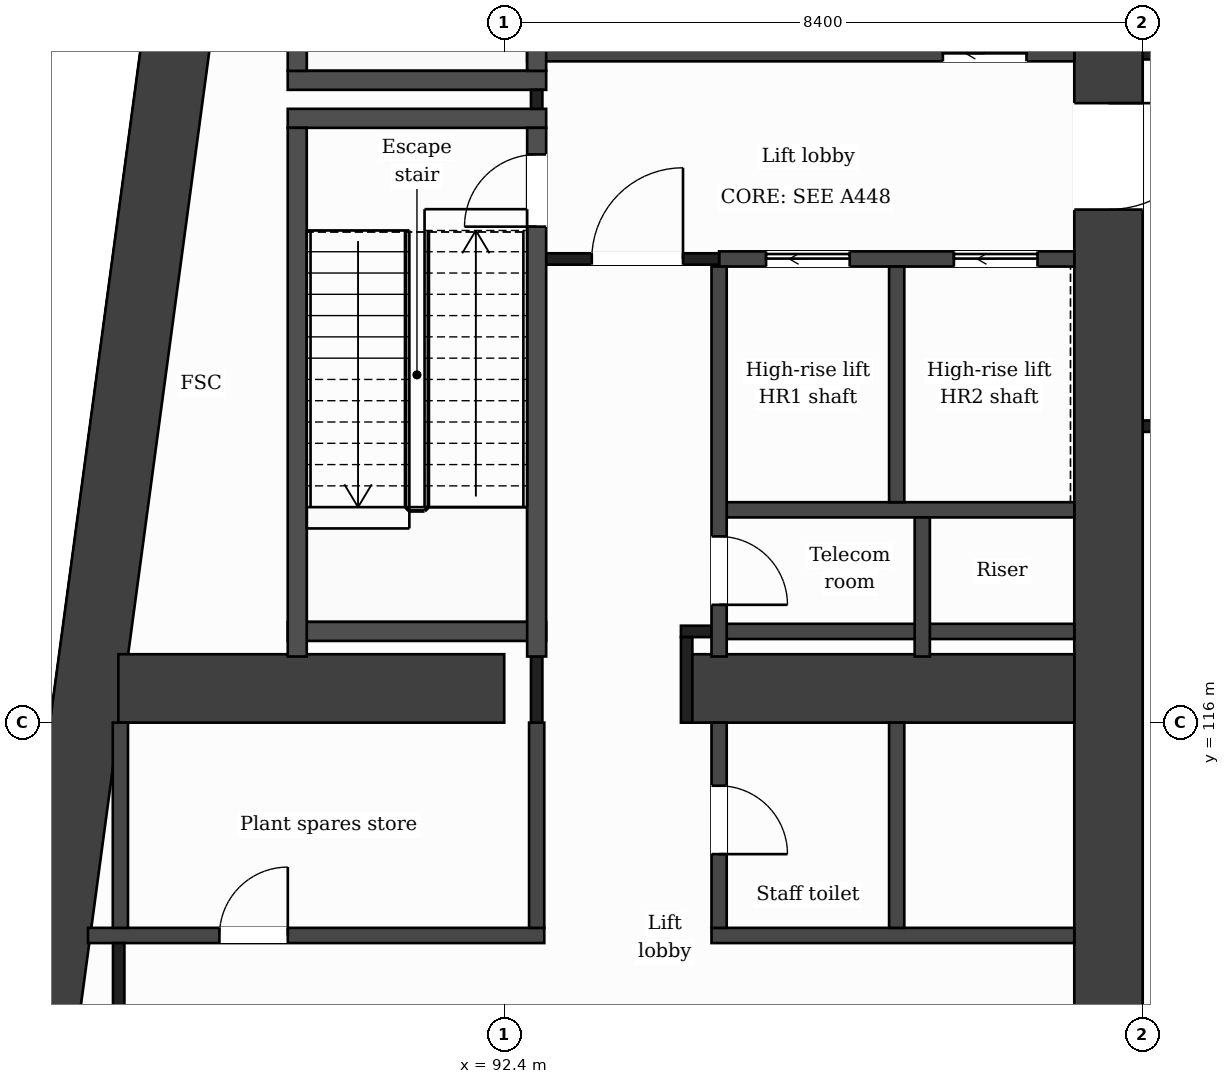
"""IFC4 building model, lengths in metres.
Left out: names, types, materials, properties, quantities, classifications, styles, units other than length and angle.
Written with IfcOpenShell. Run it as: python <this file> out.ifc"""

import sys

from ifc_helpers import new_model, si_unit, direction, frame, frame_2d, origin, place, context, subcontext, project, spatial, rectangle, extrude, element, fill, save


model = new_model("IFC4")
c1 = context("Model", 3, precision=1e-05, world=origin(), true_north=direction((0.0, 1.0)))
c2 = subcontext(c1, "Body", "Model", "MODEL_VIEW")
j1 = project(units=[si_unit("LENGTHUNIT", "METRE"), si_unit("PLANEANGLEUNIT", "RADIAN")], contexts=[c1])
p1 = place(None, origin())
s1 = spatial("IfcSite", under=j1, at=p1, CompositionType="ELEMENT")
p2 = place(p1, origin())
s2 = spatial("IfcBuilding", under=s1, at=p2, CompositionType="ELEMENT")
p3 = place(p2, frame((0.0, 0.0, 197.2)))
s3 = spatial("IfcBuildingStorey", under=s2, at=p3, CompositionType="ELEMENT", Elevation=197.2)
p4 = place(p3, frame((100.35, 131.95, 0.0), z_axis=(0.0, 0.0, 1.0), x_axis=(0.0, -1.0, 0.0)))
e1 = element("IfcWall", 1, at=p4, inside=s3, PredefinedType="SHEAR", context=c2, shape_type="SweptSolid", body=[
    extrude(rectangle(XDim=21.1, YDim=0.9, at=frame_2d((10.55, 0.0))), origin(), (0.0, 0.0, 1.0), 5.0),
])
p5 = place(p4, frame((2.35, 0.0, 0.0)))
e2 = element("IfcOpeningElement", 2, at=p5, cuts=e1, PredefinedType="OPENING", context=c2, shape_type="SweptSolid", body=[
    extrude(rectangle(XDim=1.2, YDim=2.1, at=frame_2d((0.6, 1.05))), frame((0.0, 0.46, 0.0), z_axis=(0.0, -1.0, 0.0), x_axis=(1.0, 0.0, 0.0)), (0.0, 0.0, 1.0), 0.92),
])
p6 = place(p4, frame((7.8, 0.0, 0.0)))
e3 = element("IfcOpeningElement", 3, at=p6, cuts=e1, PredefinedType="OPENING", context=c2, shape_type="SweptSolid", body=[
    extrude(rectangle(XDim=1.4, YDim=2.1, at=frame_2d((0.7, 1.05))), frame((0.0, 0.46, 0.0), z_axis=(0.0, -1.0, 0.0), x_axis=(1.0, 0.0, 0.0)), (0.0, 0.0, 1.0), 0.92),
])
p7 = place(p3, frame((86.184, 110.85, 0.0), z_axis=(0.0, 0.0, 1.0), x_axis=(0.133410495943, 0.991060865725, 0.0)))
e4 = element("IfcWall", 4, at=p7, inside=s3, PredefinedType="SHEAR", context=c2, shape_type="SweptSolid", body=[
    extrude(rectangle(XDim=21.29, YDim=0.9, at=frame_2d((10.645, 0.0))), origin(), (0.0, 0.0, 1.0), 5.0),
])
p8 = place(p3, frame((87.323, 116.45, 0.0), z_axis=(0.0, 0.0, 1.0), x_axis=(1.0, 0.0, 0.0)))
e5 = element("IfcWall", 5, at=p8, inside=s3, PredefinedType="SHEAR", context=c2, shape_type="SweptSolid", body=[
    extrude(rectangle(XDim=5.077, YDim=0.9, at=frame_2d((2.539, 0.0))), origin(), (0.0, 0.0, 1.0), 5.0),
])
p9 = place(p3, frame((94.8, 116.45, 0.0), z_axis=(0.0, 0.0, 1.0), x_axis=(1.0, 0.0, 0.0)))
e6 = element("IfcWall", 6, at=p9, inside=s3, PredefinedType="SHEAR", context=c2, shape_type="SweptSolid", body=[
    extrude(rectangle(XDim=5.1, YDim=0.9, at=frame_2d((2.55, 0.0))), origin(), (0.0, 0.0, 1.0), 5.0),
])
p10 = place(p3, frame((86.924, 113.2, 0.0), z_axis=(0.0, 0.0, 1.0), x_axis=(1.0, 0.0, 0.0)))
e7 = element("IfcWall", 7, at=p10, inside=s3, PredefinedType="PARTITIONING", context=c2, shape_type="SweptSolid", body=[
    extrude(rectangle(XDim=6.003, YDim=0.2, at=frame_2d((3.001, 0.0))), origin(), (0.0, 0.0, 1.0), 4.68),
])
p11 = place(p10, frame((1.729, 0.0, 0.0)))
e8 = element("IfcOpeningElement", 8, at=p11, cuts=e7, PredefinedType="OPENING", context=c2, shape_type="SweptSolid", body=[
    extrude(rectangle(XDim=0.9, YDim=2.1, at=frame_2d((0.45, 1.05))), frame((0.0, 0.11, 0.0), z_axis=(0.0, -1.0, 0.0), x_axis=(1.0, 0.0, 0.0)), (0.0, 0.0, 1.0), 0.22),
])
p12 = place(p3, frame((95.127, 113.2, 0.0), z_axis=(0.0, 0.0, 1.0), x_axis=(1.0, 0.0, 0.0)))
e9 = element("IfcWall", 9, at=p12, inside=s3, PredefinedType="PARTITIONING", context=c2, shape_type="SweptSolid", body=[
    extrude(rectangle(XDim=4.773, YDim=0.2, at=frame_2d((2.386, 0.0))), origin(), (0.0, 0.0, 1.0), 4.68),
])
p13 = place(p3, frame((95.227, 117.2, 0.0), z_axis=(0.0, 0.0, 1.0), x_axis=(1.0, 0.0, 0.0)))
e10 = element("IfcWall", 10, at=p13, inside=s3, PredefinedType="PARTITIONING", context=c2, shape_type="SweptSolid", body=[
    extrude(rectangle(XDim=4.673, YDim=0.2, at=frame_2d((2.336, 0.0))), origin(), (0.0, 0.0, 1.0), 4.68),
])
p14 = place(p3, frame((94.725, 117.2, 0.0), z_axis=(0.0, 0.0, 1.0), x_axis=(1.0, 0.0, 0.0)))
e11 = element("IfcWall", 11, at=p14, inside=s3, PredefinedType="PARTITIONING", context=c2, shape_type="SweptSolid", body=[
    extrude(rectangle(XDim=0.502, YDim=0.15, at=frame_2d((0.251, 0.0))), origin(), (0.0, 0.0, 1.0), 4.68),
])
p15 = place(p3, frame((89.552, 117.2, 0.0), z_axis=(0.0, 0.0, 1.0), x_axis=(1.0, 0.0, 0.0)))
e12 = element("IfcWall", 12, at=p15, inside=s3, PredefinedType="PARTITIONING", context=c2, shape_type="SweptSolid", body=[
    extrude(rectangle(XDim=3.4, YDim=0.25, at=frame_2d((1.7, 0.0))), origin(), (0.0, 0.0, 1.0), 4.68),
])
p16 = place(p3, frame((95.227, 118.8, 0.0), z_axis=(0.0, 0.0, 1.0), x_axis=(1.0, 0.0, 0.0)))
e13 = element("IfcWall", 13, at=p16, inside=s3, PredefinedType="PARTITIONING", context=c2, shape_type="SweptSolid", body=[
    extrude(rectangle(XDim=4.673, YDim=0.2, at=frame_2d((2.336, 0.0))), origin(), (0.0, 0.0, 1.0), 4.68),
])
p17 = place(p3, frame((100.8, 119.9, 0.0), z_axis=(0.0, 0.0, 1.0), x_axis=(1.0, 0.0, 0.0)))
e14 = element("IfcWall", 14, at=p17, inside=s3, PredefinedType="PARTITIONING", context=c2, shape_type="SweptSolid", body=[
    extrude(rectangle(XDim=25.2, YDim=0.15, at=frame_2d((12.6, 0.0))), origin(), (0.0, 0.0, 1.0), 4.68),
])
p18 = place(p17, frame((3.6, 0.0, 0.0)))
e15 = element("IfcOpeningElement", 15, at=p18, cuts=e14, PredefinedType="OPENING", context=c2, shape_type="SweptSolid", body=[
    extrude(rectangle(XDim=1.2, YDim=2.1, at=frame_2d((0.6, 1.05))), frame((0.0, 0.085, 0.0), z_axis=(0.0, -1.0, 0.0), x_axis=(1.0, 0.0, 0.0)), (0.0, 0.0, 1.0), 0.17),
])
p19 = place(p17, frame((12.0, 0.0, 0.0)))
e16 = element("IfcOpeningElement", 16, at=p19, cuts=e14, PredefinedType="OPENING", context=c2, shape_type="SweptSolid", body=[
    extrude(rectangle(XDim=1.2, YDim=2.1, at=frame_2d((0.6, 1.05))), frame((0.0, 0.085, 0.0), z_axis=(0.0, -1.0, 0.0), x_axis=(1.0, 0.0, 0.0)), (0.0, 0.0, 1.0), 0.17),
])
p20 = place(p17, frame((20.4, 0.0, 0.0)))
e17 = element("IfcOpeningElement", 17, at=p20, cuts=e14, PredefinedType="OPENING", context=c2, shape_type="SweptSolid", body=[
    extrude(rectangle(XDim=1.2, YDim=2.1, at=frame_2d((0.6, 1.05))), frame((0.0, 0.085, 0.0), z_axis=(0.0, -1.0, 0.0), x_axis=(1.0, 0.0, 0.0)), (0.0, 0.0, 1.0), 0.17),
])
p21 = place(p3, frame((95.227, 122.1, 0.0), z_axis=(0.0, 0.0, 1.0), x_axis=(1.0, 0.0, 0.0)))
e18 = element("IfcWall", 18, at=p21, inside=s3, PredefinedType="PARTITIONING", context=c2, shape_type="SweptSolid", body=[
    extrude(rectangle(XDim=4.673, YDim=0.2, at=frame_2d((2.336, 0.0))), origin(), (0.0, 0.0, 1.0), 4.68),
])
p22 = place(p21, frame((0.618, 0.0, 0.0)))
e19 = element("IfcOpeningElement", 19, at=p22, cuts=e18, PredefinedType="OPENING", context=c2, shape_type="SweptSolid", body=[
    extrude(rectangle(XDim=1.1, YDim=2.1, at=frame_2d((0.55, 1.05))), frame((0.0, 0.11, 0.0), z_axis=(0.0, -1.0, 0.0), x_axis=(1.0, 0.0, 0.0)), (0.0, 0.0, 1.0), 0.22),
])
p23 = place(p21, frame((3.089, 0.0, 0.0)))
e20 = element("IfcOpeningElement", 20, at=p23, cuts=e18, PredefinedType="OPENING", context=c2, shape_type="SweptSolid", body=[
    extrude(rectangle(XDim=1.1, YDim=2.1, at=frame_2d((0.55, 1.05))), frame((0.0, 0.11, 0.0), z_axis=(0.0, -1.0, 0.0), x_axis=(1.0, 0.0, 0.0)), (0.0, 0.0, 1.0), 0.22),
])
p24 = place(p3, frame((92.827, 122.1, 0.0), z_axis=(0.0, 0.0, 1.0), x_axis=(1.0, 0.0, 0.0)))
e21 = element("IfcWall", 21, at=p24, inside=s3, PredefinedType="PARTITIONING", context=c2, shape_type="SweptSolid", body=[
    extrude(rectangle(XDim=2.4, YDim=0.15, at=frame_2d((1.2, 0.0))), origin(), (0.0, 0.0, 1.0), 4.68),
])
p25 = place(p24, frame((0.725, 0.0, 0.0)))
e22 = element("IfcOpeningElement", 22, at=p25, cuts=e21, PredefinedType="OPENING", context=c2, shape_type="SweptSolid", body=[
    extrude(rectangle(XDim=1.2, YDim=2.1, at=frame_2d((0.6, 1.05))), frame((0.0, 0.085, 0.0), z_axis=(0.0, -1.0, 0.0), x_axis=(1.0, 0.0, 0.0)), (0.0, 0.0, 1.0), 0.17),
])
for number, where, z_axis, x_axis in (
    (23, (89.552, 123.95, 0.0), (0.0, 0.0, 1.0), (1.0, 0.0, 0.0)),
    (24, (89.552, 124.45, 0.0), (0.0, 0.0, 1.0), (1.0, 0.0, 0.0)),
):
    element("IfcWall", number, at=place(p3, frame(where, z_axis=z_axis, x_axis=x_axis)), inside=s3, PredefinedType="PARTITIONING", context=c2, shape_type="SweptSolid", body=[
        extrude(rectangle(XDim=3.4, YDim=0.25, at=frame_2d((1.7, 0.0))), origin(), (0.0, 0.0, 1.0), 4.68),
    ])
p26 = place(p3, frame((92.702, 124.8, 0.0), z_axis=(0.0, 0.0, 1.0), x_axis=(1.0, 0.0, 0.0)))
e25 = element("IfcWall", 25, at=p26, inside=s3, PredefinedType="PARTITIONING", context=c2, shape_type="SweptSolid", body=[
    extrude(rectangle(XDim=7.198, YDim=0.2, at=frame_2d((3.599, 0.0))), origin(), (0.0, 0.0, 1.0), 4.68),
])
p27 = place(p26, frame((5.469, 0.0, 0.0)))
e26 = element("IfcOpeningElement", 26, at=p27, cuts=e25, PredefinedType="OPENING", context=c2, shape_type="SweptSolid", body=[
    extrude(rectangle(XDim=1.1, YDim=2.1, at=frame_2d((0.55, 1.05))), frame((0.0, 0.11, 0.0), z_axis=(0.0, -1.0, 0.0), x_axis=(1.0, 0.0, 0.0)), (0.0, 0.0, 1.0), 0.22),
])
p28 = place(p3, frame((100.8, 124.8, 0.0), z_axis=(0.0, 0.0, 1.0), x_axis=(1.0, 0.0, 0.0)))
e27 = element("IfcWall", 27, at=p28, inside=s3, PredefinedType="PARTITIONING", context=c2, shape_type="SweptSolid", body=[
    extrude(rectangle(XDim=25.2, YDim=0.15, at=frame_2d((12.6, 0.0))), origin(), (0.0, 0.0, 1.0), 4.68),
])
p29 = place(p28, frame((3.6, 0.0, 0.0)))
e28 = element("IfcOpeningElement", 28, at=p29, cuts=e27, PredefinedType="OPENING", context=c2, shape_type="SweptSolid", body=[
    extrude(rectangle(XDim=1.2, YDim=2.1, at=frame_2d((0.6, 1.05))), frame((0.0, 0.085, 0.0), z_axis=(0.0, -1.0, 0.0), x_axis=(1.0, 0.0, 0.0)), (0.0, 0.0, 1.0), 0.17),
])
p30 = place(p28, frame((12.0, 0.0, 0.0)))
e29 = element("IfcOpeningElement", 29, at=p30, cuts=e27, PredefinedType="OPENING", context=c2, shape_type="SweptSolid", body=[
    extrude(rectangle(XDim=1.2, YDim=2.1, at=frame_2d((0.6, 1.05))), frame((0.0, 0.085, 0.0), z_axis=(0.0, -1.0, 0.0), x_axis=(1.0, 0.0, 0.0)), (0.0, 0.0, 1.0), 0.17),
])
p31 = place(p28, frame((20.4, 0.0, 0.0)))
e30 = element("IfcOpeningElement", 30, at=p31, cuts=e27, PredefinedType="OPENING", context=c2, shape_type="SweptSolid", body=[
    extrude(rectangle(XDim=1.2, YDim=2.1, at=frame_2d((0.6, 1.05))), frame((0.0, 0.085, 0.0), z_axis=(0.0, -1.0, 0.0), x_axis=(1.0, 0.0, 0.0)), (0.0, 0.0, 1.0), 0.17),
])
p32 = place(p3, frame((87.35, 113.3, 0.0), z_axis=(0.0, 0.0, 1.0), x_axis=(0.0, 1.0, 0.0)))
e31 = element("IfcWall", 31, at=p32, inside=s3, PredefinedType="PARTITIONING", context=c2, shape_type="SweptSolid", body=[
    extrude(rectangle(XDim=2.7, YDim=0.2, at=frame_2d((1.35, 0.0))), origin(), (0.0, 0.0, 1.0), 4.68),
])
p33 = place(p3, frame((87.328, 111.3, 0.0), z_axis=(0.0, 0.0, 1.0), x_axis=(0.0, 1.0, 0.0)))
e32 = element("IfcWall", 32, at=p33, inside=s3, PredefinedType="PARTITIONING", context=c2, shape_type="SweptSolid", body=[
    extrude(rectangle(XDim=1.8, YDim=0.15, at=frame_2d((0.9, 0.0))), origin(), (0.0, 0.0, 1.0), 4.68),
])
p34 = place(p3, frame((89.677, 116.87, 0.0), z_axis=(0.0, 0.0, 1.0), x_axis=(0.0, 1.0, 0.0)))
e33 = element("IfcWall", 33, at=p34, inside=s3, PredefinedType="PARTITIONING", context=c2, shape_type="SweptSolid", body=[
    extrude(rectangle(XDim=6.955, YDim=0.25, at=frame_2d((3.478, 0.0))), origin(), (0.0, 0.0, 1.0), 4.68),
])
p35 = place(p3, frame((89.677, 124.575, 0.0), z_axis=(0.0, 0.0, 1.0), x_axis=(0.0, 1.0, 0.0)))
e34 = element("IfcWall", 34, at=p35, inside=s3, PredefinedType="PARTITIONING", context=c2, shape_type="SweptSolid", body=[
    extrude(rectangle(XDim=6.955, YDim=0.25, at=frame_2d((3.478, 0.0))), origin(), (0.0, 0.0, 1.0), 4.68),
])
p36 = place(p3, frame((92.827, 113.3, 0.0), z_axis=(0.0, 0.0, 1.0), x_axis=(0.0, 1.0, 0.0)))
e35 = element("IfcWall", 35, at=p36, inside=s3, PredefinedType="PARTITIONING", context=c2, shape_type="SweptSolid", body=[
    extrude(rectangle(XDim=2.7, YDim=0.2, at=frame_2d((1.35, 0.0))), origin(), (0.0, 0.0, 1.0), 4.68),
])
p37 = place(p3, frame((92.827, 116.0, 0.0), z_axis=(0.0, 0.0, 1.0), x_axis=(0.0, 1.0, 0.0)))
e36 = element("IfcWall", 36, at=p37, inside=s3, PredefinedType="PARTITIONING", context=c2, shape_type="SweptSolid", body=[
    extrude(rectangle(XDim=0.87, YDim=0.15, at=frame_2d((0.435, 0.0))), origin(), (0.0, 0.0, 1.0), 4.68),
])
p38 = place(p3, frame((92.827, 124.075, 0.0), z_axis=(0.0, 0.0, 1.0), x_axis=(0.0, 1.0, 0.0)))
e37 = element("IfcWall", 37, at=p38, inside=s3, PredefinedType="PARTITIONING", context=c2, shape_type="SweptSolid", body=[
    extrude(rectangle(XDim=0.25, YDim=0.15, at=frame_2d((0.125, 0.0))), origin(), (0.0, 0.0, 1.0), 4.68),
])
p39 = place(p3, frame((92.827, 116.87, 0.0), z_axis=(0.0, 0.0, 1.0), x_axis=(0.0, 1.0, 0.0)))
e38 = element("IfcWall", 38, at=p39, inside=s3, PredefinedType="PARTITIONING", context=c2, shape_type="SweptSolid", body=[
    extrude(rectangle(XDim=6.955, YDim=0.25, at=frame_2d((3.478, 0.0))), origin(), (0.0, 0.0, 1.0), 4.68),
])
p40 = place(p39, frame((5.655, 0.0, 0.0)))
e39 = element("IfcOpeningElement", 39, at=p40, cuts=e38, PredefinedType="OPENING", context=c2, shape_type="SweptSolid", body=[
    extrude(rectangle(XDim=0.95, YDim=2.1, at=frame_2d((0.475, 1.05))), frame((0.0, 0.135, 0.0), z_axis=(0.0, -1.0, 0.0), x_axis=(1.0, 0.0, 0.0)), (0.0, 0.0, 1.0), 0.27),
])
p41 = place(p3, frame((92.827, 124.575, 0.0), z_axis=(0.0, 0.0, 1.0), x_axis=(0.0, 1.0, 0.0)))
e40 = element("IfcWall", 40, at=p41, inside=s3, PredefinedType="PARTITIONING", context=c2, shape_type="SweptSolid", body=[
    extrude(rectangle(XDim=6.955, YDim=0.25, at=frame_2d((3.478, 0.0))), origin(), (0.0, 0.0, 1.0), 4.68),
])
p42 = place(p41, frame((5.325, 0.0, 0.0)))
e41 = element("IfcOpeningElement", 41, at=p42, cuts=e40, PredefinedType="OPENING", context=c2, shape_type="SweptSolid", body=[
    extrude(rectangle(XDim=1.0, YDim=2.1, at=frame_2d((0.5, 1.05))), frame((0.0, 0.135, 0.0), z_axis=(0.0, -1.0, 0.0), x_axis=(1.0, 0.0, 0.0)), (0.0, 0.0, 1.0), 0.27),
])
p43 = place(p3, frame((94.8, 116.0, 0.0), z_axis=(0.0, 0.0, 1.0), x_axis=(0.0, 1.0, 0.0)))
e42 = element("IfcWall", 42, at=p43, inside=s3, PredefinedType="PARTITIONING", context=c2, shape_type="SweptSolid", body=[
    extrude(rectangle(XDim=1.125, YDim=0.15, at=frame_2d((0.562, 0.0))), origin(), (0.0, 0.0, 1.0), 4.68),
])
p44 = place(p3, frame((95.227, 113.3, 0.0), z_axis=(0.0, 0.0, 1.0), x_axis=(0.0, 1.0, 0.0)))
e43 = element("IfcWall", 43, at=p44, inside=s3, PredefinedType="PARTITIONING", context=c2, shape_type="SweptSolid", body=[
    extrude(rectangle(XDim=2.7, YDim=0.2, at=frame_2d((1.35, 0.0))), origin(), (0.0, 0.0, 1.0), 4.68),
])
p45 = place(p44, frame((0.97, 0.0, 0.0)))
e44 = element("IfcOpeningElement", 44, at=p45, cuts=e43, PredefinedType="OPENING", context=c2, shape_type="SweptSolid", body=[
    extrude(rectangle(XDim=0.9, YDim=2.1, at=frame_2d((0.45, 1.05))), frame((0.0, 0.11, 0.0), z_axis=(0.0, -1.0, 0.0), x_axis=(1.0, 0.0, 0.0)), (0.0, 0.0, 1.0), 0.22),
])
p46 = place(p3, frame((95.227, 116.87, 0.0), z_axis=(0.0, 0.0, 1.0), x_axis=(0.0, 1.0, 0.0)))
e45 = element("IfcWall", 45, at=p46, inside=s3, PredefinedType="PARTITIONING", context=c2, shape_type="SweptSolid", body=[
    extrude(rectangle(XDim=5.13, YDim=0.2, at=frame_2d((2.565, 0.0))), origin(), (0.0, 0.0, 1.0), 4.68),
])
p47 = place(p46, frame((0.68, 0.0, 0.0)))
e46 = element("IfcOpeningElement", 46, at=p47, cuts=e45, PredefinedType="OPENING", context=c2, shape_type="SweptSolid", body=[
    extrude(rectangle(XDim=0.9, YDim=2.1, at=frame_2d((0.45, 1.05))), frame((0.0, 0.11, 0.0), z_axis=(0.0, -1.0, 0.0), x_axis=(1.0, 0.0, 0.0)), (0.0, 0.0, 1.0), 0.22),
])
p48 = place(p3, frame((97.563, 113.3, 0.0), z_axis=(0.0, 0.0, 1.0), x_axis=(0.0, 1.0, 0.0)))
e47 = element("IfcWall", 47, at=p48, inside=s3, PredefinedType="PARTITIONING", context=c2, shape_type="SweptSolid", body=[
    extrude(rectangle(XDim=2.7, YDim=0.2, at=frame_2d((1.35, 0.0))), origin(), (0.0, 0.0, 1.0), 4.68),
])
p49 = place(p3, frame((97.563, 118.9, 0.0), z_axis=(0.0, 0.0, 1.0), x_axis=(0.0, 1.0, 0.0)))
e48 = element("IfcWall", 48, at=p49, inside=s3, PredefinedType="PARTITIONING", context=c2, shape_type="SweptSolid", body=[
    extrude(rectangle(XDim=3.1, YDim=0.2, at=frame_2d((1.55, 0.0))), origin(), (0.0, 0.0, 1.0), 4.68),
])
p50 = place(p3, frame((97.9, 116.87, 0.0), z_axis=(0.0, 0.0, 1.0), x_axis=(0.0, 1.0, 0.0)))
e49 = element("IfcWall", 49, at=p50, inside=s3, PredefinedType="PARTITIONING", context=c2, shape_type="SweptSolid", body=[
    extrude(rectangle(XDim=1.83, YDim=0.2, at=frame_2d((0.915, 0.0))), origin(), (0.0, 0.0, 1.0), 4.68),
])
p51 = place(p25, origin())
e50 = element("IfcDoor", 50, at=p51, inside=s3, OperationType="SINGLE_SWING_RIGHT", PredefinedType="DOOR", context=c2, shape_type="SweptSolid", body=[
    extrude(rectangle(XDim=1.2, YDim=2.1, at=frame_2d((0.6, 1.05))), frame((0.0, 0.025, 0.0), z_axis=(0.0, -1.0, 0.0), x_axis=(1.0, 0.0, 0.0)), (0.0, 0.0, 1.0), 0.05),
])
fill(e22, e50)
p52 = place(p22, origin())
e51 = element("IfcDoor", 51, at=p52, inside=s3, OperationType="SLIDING_TO_LEFT", PredefinedType="DOOR", context=c2, shape_type="SweptSolid", body=[
    extrude(rectangle(XDim=1.1, YDim=2.1, at=frame_2d((0.55, 1.05))), frame((0.0, 0.025, 0.0), z_axis=(0.0, -1.0, 0.0), x_axis=(1.0, 0.0, 0.0)), (0.0, 0.0, 1.0), 0.05),
])
fill(e19, e51)
p53 = place(p23, origin())
e52 = element("IfcDoor", 52, at=p53, inside=s3, OperationType="SLIDING_TO_LEFT", PredefinedType="DOOR", context=c2, shape_type="SweptSolid", body=[
    extrude(rectangle(XDim=1.1, YDim=2.1, at=frame_2d((0.55, 1.05))), frame((0.0, 0.025, 0.0), z_axis=(0.0, -1.0, 0.0), x_axis=(1.0, 0.0, 0.0)), (0.0, 0.0, 1.0), 0.05),
])
fill(e20, e52)
p54 = place(p27, origin())
e53 = element("IfcDoor", 53, at=p54, inside=s3, OperationType="SLIDING_TO_LEFT", PredefinedType="DOOR", context=c2, shape_type="SweptSolid", body=[
    extrude(rectangle(XDim=1.1, YDim=2.1, at=frame_2d((0.55, 1.05))), frame((0.0, 0.025, 0.0), z_axis=(0.0, -1.0, 0.0), x_axis=(1.0, 0.0, 0.0)), (0.0, 0.0, 1.0), 0.05),
])
fill(e26, e53)
p55 = place(p40, origin())
e54 = element("IfcDoor", 54, at=p55, inside=s3, OperationType="SINGLE_SWING_LEFT", PredefinedType="DOOR", context=c2, shape_type="SweptSolid", body=[
    extrude(rectangle(XDim=0.95, YDim=2.1, at=frame_2d((0.475, 1.05))), frame((0.0, 0.025, 0.0), z_axis=(0.0, -1.0, 0.0), x_axis=(1.0, 0.0, 0.0)), (0.0, 0.0, 1.0), 0.05),
])
fill(e39, e54)
p56 = place(p47, origin())
e55 = element("IfcDoor", 55, at=p56, inside=s3, OperationType="SINGLE_SWING_LEFT", PredefinedType="DOOR", context=c2, shape_type="SweptSolid", body=[
    extrude(rectangle(XDim=0.9, YDim=2.1, at=frame_2d((0.45, 1.05))), frame((0.0, 0.025, 0.0), z_axis=(0.0, -1.0, 0.0), x_axis=(1.0, 0.0, 0.0)), (0.0, 0.0, 1.0), 0.05),
])
fill(e46, e55)
p57 = place(p11, origin())
e56 = element("IfcDoor", 56, at=p57, inside=s3, OperationType="SINGLE_SWING_RIGHT", PredefinedType="DOOR", context=c2, shape_type="SweptSolid", body=[
    extrude(rectangle(XDim=0.9, YDim=2.1, at=frame_2d((0.45, 1.05))), frame((0.0, 0.025, 0.0), z_axis=(0.0, -1.0, 0.0), x_axis=(1.0, 0.0, 0.0)), (0.0, 0.0, 1.0), 0.05),
])
fill(e8, e56)
p58 = place(p45, origin())
e57 = element("IfcDoor", 57, at=p58, inside=s3, OperationType="SINGLE_SWING_LEFT", PredefinedType="DOOR", context=c2, shape_type="SweptSolid", body=[
    extrude(rectangle(XDim=0.9, YDim=2.1, at=frame_2d((0.45, 1.05))), frame((0.0, 0.025, 0.0), z_axis=(0.0, -1.0, 0.0), x_axis=(1.0, 0.0, 0.0)), (0.0, 0.0, 1.0), 0.05),
])
fill(e44, e57)
p59 = place(p6, origin())
e58 = element("IfcDoor", 58, at=p59, inside=s3, OperationType="SINGLE_SWING_LEFT", PredefinedType="DOOR", context=c2, shape_type="SweptSolid", body=[
    extrude(rectangle(XDim=1.4, YDim=2.1, at=frame_2d((0.7, 1.05))), frame((0.0, 0.025, 0.0), z_axis=(0.0, -1.0, 0.0), x_axis=(1.0, 0.0, 0.0)), (0.0, 0.0, 1.0), 0.05),
])
fill(e3, e58)
save(model, sys.argv[1])
